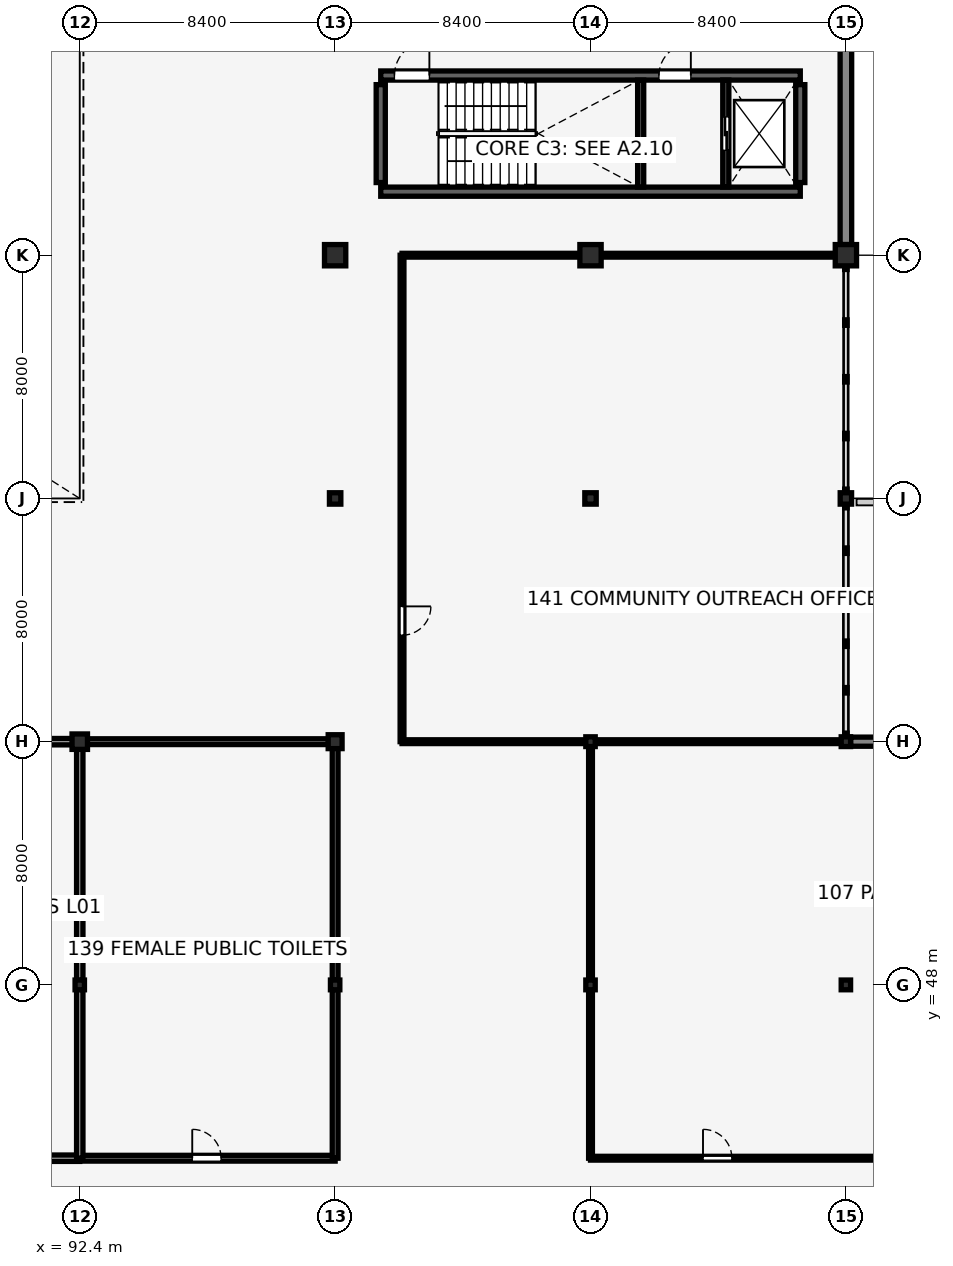
"""IFC4 building model, lengths in metres.
Left out: names, types, materials, properties, quantities, classifications, styles, units other than length and angle.
Written with IfcOpenShell. Run it as: python <this file> out.ifc"""

import sys

from ifc_helpers import new_model, si_unit, direction, frame, frame_2d, origin, origin_2d, place, context, subcontext, project, spatial, rectangle, hollow_circle, i_section, extrude, element, fill, save


model = new_model("IFC4")
c1 = context("Model", 3, precision=1e-05, world=origin(), true_north=direction((0.0, 1.0)))
c2 = subcontext(c1, "Body", "Model", "MODEL_VIEW")
j1 = project(units=[si_unit("LENGTHUNIT", "METRE"), si_unit("PLANEANGLEUNIT", "RADIAN")], contexts=[c1])
p1 = place(None, origin())
s1 = spatial("IfcSite", under=j1, at=p1, CompositionType="ELEMENT")
p2 = place(p1, origin())
s2 = spatial("IfcBuilding", under=s1, at=p2, CompositionType="ELEMENT")
p3 = place(p2, frame((0.0, 0.0, 5.44)))
s3 = spatial("IfcBuildingStorey", under=s2, at=p3, CompositionType="ELEMENT", Elevation=5.44)
p4 = place(p3, frame((102.3, 74.09, 0.0), z_axis=(0.0, 0.0, 1.0), x_axis=(1.0, 0.0, 0.0)))
e1 = element("IfcWall", 1, at=p4, inside=s3, PredefinedType="SHEAR", context=c2, shape_type="SweptSolid", body=[
    extrude(rectangle(XDim=13.8, YDim=0.3, at=frame_2d((6.9, 0.0))), origin(), (0.0, 0.0, 1.0), 3.8),
])
p5 = place(p3, frame((102.3, 77.91, 0.0), z_axis=(0.0, 0.0, 1.0), x_axis=(1.0, 0.0, 0.0)))
e2 = element("IfcWall", 2, at=p5, inside=s3, PredefinedType="SHEAR", context=c2, shape_type="SweptSolid", body=[
    extrude(rectangle(XDim=13.8, YDim=0.3, at=frame_2d((6.9, 0.0))), origin(), (0.0, 0.0, 1.0), 3.8),
])
p6 = place(p5, frame((0.45, 0.0, 0.0), z_axis=(0.0, 0.0, 1.0), x_axis=(1.0, 0.0, 0.0)))
e3 = element("IfcOpeningElement", 3, at=p6, cuts=e2, PredefinedType="OPENING", context=c2, shape_type="SweptSolid", body=[
    extrude(rectangle(XDim=1.15, YDim=2.15, at=frame_2d((0.575, 1.075))), frame((0.0, 0.16, 0.0), z_axis=(0.0, -1.0, 0.0), x_axis=(1.0, 0.0, 0.0)), (0.0, 0.0, 1.0), 0.32),
])
p7 = place(p5, frame((9.15, 0.0, 0.0), z_axis=(0.0, 0.0, 1.0), x_axis=(1.0, 0.0, 0.0)))
e4 = element("IfcOpeningElement", 4, at=p7, cuts=e2, PredefinedType="OPENING", context=c2, shape_type="SweptSolid", body=[
    extrude(rectangle(XDim=1.05, YDim=2.15, at=frame_2d((0.525, 1.075))), frame((0.0, 0.16, 0.0), z_axis=(0.0, -1.0, 0.0), x_axis=(1.0, 0.0, 0.0)), (0.0, 0.0, 1.0), 0.32),
])
for number, where, z_axis, x_axis in (
    (5, (102.3, 74.39, 0.0), (0.0, 0.0, 1.0), (0.0, 1.0, 0.0)),
    (6, (116.1, 74.39, 0.0), (0.0, 0.0, 1.0), (0.0, 1.0, 0.0)),
):
    element("IfcWall", number, at=place(p3, frame(where, z_axis=z_axis, x_axis=x_axis)), inside=s3, PredefinedType="SHEAR", context=c2, shape_type="SweptSolid", body=[
        extrude(rectangle(XDim=3.22, YDim=0.3, at=frame_2d((1.61, 0.0))), origin(), (0.0, 0.0, 1.0), 3.8),
    ])
p8 = place(p3, frame((92.4, 48.0, 0.0), z_axis=(0.0, 0.0, 1.0), x_axis=(1.0, 0.0, 0.0)))
e7 = element("IfcColumn", 7, at=p8, inside=s3, PredefinedType="COLUMN", context=c2, shape_type="SweptSolid", body=[
    extrude(i_section(OverallWidth=0.309, OverallDepth=0.321, WebThickness=0.014, FlangeThickness=0.022, FilletRadius=0.015, at=origin_2d()), origin(), (0.0, 0.0, 1.0), 3.8),
])
p9 = place(p3, frame((92.4, 56.0, 0.0), z_axis=(0.0, 0.0, 1.0), x_axis=(1.0, 0.0, 0.0)))
e8 = element("IfcColumn", 8, at=p9, inside=s3, PredefinedType="COLUMN", context=c2, shape_type="SweptSolid", body=[
    extrude(hollow_circle(Radius=0.229, WallThickness=0.016, at=origin_2d()), origin(), (0.0, 0.0, 1.0), 12.952),
])
p10 = place(p3, frame((100.8, 48.0, 0.0), z_axis=(0.0, 0.0, 1.0), x_axis=(1.0, 0.0, 0.0)))
e9 = element("IfcColumn", 9, at=p10, inside=s3, PredefinedType="COLUMN", context=c2, shape_type="SweptSolid", body=[
    extrude(i_section(OverallWidth=0.309, OverallDepth=0.321, WebThickness=0.014, FlangeThickness=0.022, FilletRadius=0.015, at=origin_2d()), origin(), (0.0, 0.0, 1.0), 3.8),
])
p11 = place(p3, frame((100.8, 56.0, 0.0), z_axis=(0.0, 0.0, 1.0), x_axis=(1.0, 0.0, 0.0)))
e10 = element("IfcColumn", 10, at=p11, inside=s3, PredefinedType="COLUMN", context=c2, shape_type="SweptSolid", body=[
    extrude(hollow_circle(Radius=0.229, WallThickness=0.016, at=origin_2d()), origin(), (0.0, 0.0, 1.0), 16.31),
])
p12 = place(p3, frame((100.8, 64.0, 0.0), z_axis=(0.0, 0.0, 1.0), x_axis=(1.0, 0.0, 0.0)))
e11 = element("IfcColumn", 11, at=p12, inside=s3, PredefinedType="COLUMN", context=c2, shape_type="SweptSolid", body=[
    extrude(i_section(OverallWidth=0.375, OverallDepth=0.375, WebThickness=0.017, FlangeThickness=0.027, FilletRadius=0.015, at=origin_2d()), origin(), (0.0, 0.0, 1.0), 3.8),
])
p13 = place(p3, frame((100.8, 72.0, 0.0), z_axis=(0.0, 0.0, 1.0), x_axis=(1.0, 0.0, 0.0)))
e12 = element("IfcColumn", 12, at=p13, inside=s3, PredefinedType="COLUMN", context=c2, shape_type="SweptSolid", body=[
    extrude(rectangle(XDim=0.7, YDim=0.7, at=origin_2d()), origin(), (0.0, 0.0, 1.0), 3.8),
])
for number, where, z_axis, x_axis in (
    (13, (109.2, 48.0, 0.0), (0.0, 0.0, 1.0), (1.0, 0.0, 0.0)),
    (14, (109.2, 56.0, 0.0), (0.0, 0.0, 1.0), (1.0, 0.0, 0.0)),
):
    element("IfcColumn", number, at=place(p3, frame(where, z_axis=z_axis, x_axis=x_axis)), inside=s3, PredefinedType="COLUMN", context=c2, shape_type="SweptSolid", body=[
        extrude(i_section(OverallWidth=0.309, OverallDepth=0.321, WebThickness=0.014, FlangeThickness=0.022, FilletRadius=0.015, at=origin_2d()), origin(), (0.0, 0.0, 1.0), 3.8),
    ])
p14 = place(p3, frame((109.2, 64.0, 0.0), z_axis=(0.0, 0.0, 1.0), x_axis=(1.0, 0.0, 0.0)))
e15 = element("IfcColumn", 15, at=p14, inside=s3, PredefinedType="COLUMN", context=c2, shape_type="SweptSolid", body=[
    extrude(i_section(OverallWidth=0.375, OverallDepth=0.375, WebThickness=0.017, FlangeThickness=0.027, FilletRadius=0.015, at=origin_2d()), origin(), (0.0, 0.0, 1.0), 3.8),
])
p15 = place(p3, frame((109.2, 72.0, 0.0), z_axis=(0.0, 0.0, 1.0), x_axis=(1.0, 0.0, 0.0)))
e16 = element("IfcColumn", 16, at=p15, inside=s3, PredefinedType="COLUMN", context=c2, shape_type="SweptSolid", body=[
    extrude(rectangle(XDim=0.7, YDim=0.7, at=origin_2d()), origin(), (0.0, 0.0, 1.0), 3.8),
])
for number, where, z_axis, x_axis in (
    (17, (117.6, 48.0, 0.0), (0.0, 0.0, 1.0), (1.0, 0.0, 0.0)),
    (18, (117.6, 56.0, 0.0), (0.0, 0.0, 1.0), (1.0, 0.0, 0.0)),
):
    element("IfcColumn", number, at=place(p3, frame(where, z_axis=z_axis, x_axis=x_axis)), inside=s3, PredefinedType="COLUMN", context=c2, shape_type="SweptSolid", body=[
        extrude(i_section(OverallWidth=0.309, OverallDepth=0.321, WebThickness=0.014, FlangeThickness=0.022, FilletRadius=0.015, at=origin_2d()), origin(), (0.0, 0.0, 1.0), 3.8),
    ])
p16 = place(p3, frame((117.6, 64.0, 0.0), z_axis=(0.0, 0.0, 1.0), x_axis=(1.0, 0.0, 0.0)))
e19 = element("IfcColumn", 19, at=p16, inside=s3, PredefinedType="COLUMN", context=c2, shape_type="SweptSolid", body=[
    extrude(i_section(OverallWidth=0.375, OverallDepth=0.375, WebThickness=0.017, FlangeThickness=0.027, FilletRadius=0.015, at=origin_2d()), origin(), (0.0, 0.0, 1.0), 3.8),
])
p17 = place(p3, frame((117.6, 72.0, 0.0), z_axis=(0.0, 0.0, 1.0), x_axis=(1.0, 0.0, 0.0)))
e20 = element("IfcColumn", 20, at=p17, inside=s3, PredefinedType="COLUMN", context=c2, shape_type="SweptSolid", body=[
    extrude(rectangle(XDim=0.7, YDim=0.7, at=origin_2d()), origin(), (0.0, 0.0, 1.0), 3.8),
])
p18 = place(p3, frame((92.4, 56.0, 13.002), z_axis=(0.0, -0.105430502232, 0.994426673616), x_axis=(1.0, 0.0, 0.0)))
e21 = element("IfcColumn", 21, at=p18, inside=s3, PredefinedType="COLUMN", context=c2, shape_type="SweptSolid", body=[
    extrude(hollow_circle(Radius=0.254, WallThickness=0.02, at=origin_2d()), origin(), (0.0, 0.0, 1.0), 2.846),
])
p19 = place(p3, frame((117.6, 72.35, 0.0), z_axis=(0.0, 0.0, 1.0), x_axis=(0.0, 1.0, 0.0)))
e22 = element("IfcWall", 22, at=p19, inside=s3, PredefinedType="SOLIDWALL", context=c2, shape_type="SweptSolid", body=[
    extrude(rectangle(XDim=7.3, YDim=0.38, at=frame_2d((3.65, 0.0))), origin(), (0.0, 0.0, 1.0), 3.5),
])
p20 = place(p3, frame((117.755, 56.0, 0.0), z_axis=(0.0, 0.0, 1.0), x_axis=(1.0, 0.0, 0.0)))
e23 = element("IfcWall", 23, at=p20, inside=s3, PredefinedType="SOLIDWALL", context=c2, shape_type="SweptSolid", body=[
    extrude(rectangle(XDim=8.091, YDim=0.3, at=frame_2d((4.045, 0.0))), origin(), (0.0, 0.0, 1.0), 3.45),
])
p21 = place(p20, frame((2.445, 0.0, 0.9), z_axis=(0.0, 0.0, 1.0), x_axis=(1.0, 0.0, 0.0)))
e24 = element("IfcOpeningElement", 24, at=p21, cuts=e23, PredefinedType="OPENING", context=c2, shape_type="SweptSolid", body=[
    extrude(rectangle(XDim=3.2, YDim=1.65, at=frame_2d((1.6, 0.825))), frame((0.0, 0.16, 0.0), z_axis=(0.0, -1.0, 0.0), x_axis=(1.0, 0.0, 0.0)), (0.0, 0.0, 1.0), 0.32),
])
p22 = place(p3, frame((117.95, 63.88, 0.0), z_axis=(0.0, 0.0, 1.0), x_axis=(1.0, 0.0, 0.0)))
e25 = element("IfcWall", 25, at=p22, inside=s3, PredefinedType="PARAPET", context=c2, shape_type="SweptSolid", body=[
    extrude(rectangle(XDim=32.9, YDim=0.215, at=frame_2d((16.45, 0.0))), origin(), (0.0, 0.0, 1.0), 1.05),
])
p23 = place(p3, frame((110.85, 74.24, 0.0), z_axis=(0.0, 0.0, 1.0), x_axis=(0.0, 1.0, 0.0)))
e26 = element("IfcWall", 26, at=p23, inside=s3, PredefinedType="SHEAR", context=c2, shape_type="SweptSolid", body=[
    extrude(rectangle(XDim=3.52, YDim=0.2, at=frame_2d((1.76, 0.0))), origin(), (0.0, 0.0, 1.0), 3.8),
])
p24 = place(p3, frame((113.65, 74.24, 0.0), z_axis=(0.0, 0.0, 1.0), x_axis=(0.0, 1.0, 0.0)))
e27 = element("IfcWall", 27, at=p24, inside=s3, PredefinedType="SHEAR", context=c2, shape_type="SweptSolid", body=[
    extrude(rectangle(XDim=3.52, YDim=0.2, at=frame_2d((1.76, 0.0))), origin(), (0.0, 0.0, 1.0), 3.8),
])
p25 = place(p24, frame((1.21, 0.0, 0.0), z_axis=(0.0, 0.0, 1.0), x_axis=(1.0, 0.0, 0.0)))
e28 = element("IfcOpeningElement", 28, at=p25, cuts=e27, PredefinedType="OPENING", context=c2, shape_type="SweptSolid", body=[
    extrude(rectangle(XDim=1.1, YDim=2.15, at=frame_2d((0.55, 1.075))), frame((0.0, 0.11, 0.0), z_axis=(0.0, -1.0, 0.0), x_axis=(1.0, 0.0, 0.0)), (0.0, 0.0, 1.0), 0.22),
])
p26 = place(p3, frame((84.0, 42.3, 0.0), z_axis=(0.0, 0.0, 1.0), x_axis=(1.0, 0.0, 0.0)))
e29 = element("IfcWall", 29, at=p26, inside=s3, PredefinedType="PLUMBINGWALL", context=c2, shape_type="SweptSolid", body=[
    extrude(rectangle(XDim=8.4, YDim=0.21, at=frame_2d((4.2, 0.0))), origin(), (0.0, 0.0, 1.0), 3.8),
])
p27 = place(p26, frame((3.7, 0.0, 0.0), z_axis=(0.0, 0.0, 1.0), x_axis=(1.0, 0.0, 0.0)))
e30 = element("IfcOpeningElement", 30, at=p27, cuts=e29, PredefinedType="OPENING", context=c2, shape_type="SweptSolid", body=[
    extrude(rectangle(XDim=0.9, YDim=2.15, at=frame_2d((0.45, 1.075))), frame((0.0, 0.115, 0.0), z_axis=(0.0, -1.0, 0.0), x_axis=(1.0, 0.0, 0.0)), (0.0, 0.0, 1.0), 0.23),
])
p28 = place(p3, frame((92.4, 42.3, 0.0), z_axis=(0.0, 0.0, 1.0), x_axis=(1.0, 0.0, 0.0)))
e31 = element("IfcWall", 31, at=p28, inside=s3, PredefinedType="PLUMBINGWALL", context=c2, shape_type="SweptSolid", body=[
    extrude(rectangle(XDim=8.4, YDim=0.19, at=frame_2d((4.2, 0.0))), origin(), (0.0, 0.0, 1.0), 3.8),
])
p29 = place(p28, frame((3.7, 0.0, 0.0), z_axis=(0.0, 0.0, 1.0), x_axis=(1.0, 0.0, 0.0)))
e32 = element("IfcOpeningElement", 32, at=p29, cuts=e31, PredefinedType="OPENING", context=c2, shape_type="SweptSolid", body=[
    extrude(rectangle(XDim=0.95, YDim=2.15, at=frame_2d((0.475, 1.075))), frame((0.0, 0.105, 0.0), z_axis=(0.0, -1.0, 0.0), x_axis=(1.0, 0.0, 0.0)), (0.0, 0.0, 1.0), 0.21),
])
p30 = place(p3, frame((109.2, 42.3, 0.0), z_axis=(0.0, 0.0, 1.0), x_axis=(1.0, 0.0, 0.0)))
e33 = element("IfcWall", 33, at=p30, inside=s3, PredefinedType="PARTITIONING", context=c2, shape_type="SweptSolid", body=[
    extrude(rectangle(XDim=25.16, YDim=0.125, at=frame_2d((12.58, 0.0))), origin(), (0.0, 0.0, 1.0), 3.8),
])
p31 = place(p30, frame((3.7, 0.0, 0.0), z_axis=(0.0, 0.0, 1.0), x_axis=(1.0, 0.0, 0.0)))
e34 = element("IfcOpeningElement", 34, at=p31, cuts=e33, PredefinedType="OPENING", context=c2, shape_type="SweptSolid", body=[
    extrude(rectangle(XDim=0.95, YDim=2.15, at=frame_2d((0.475, 1.075))), frame((0.0, 0.073, 0.0), z_axis=(0.0, -1.0, 0.0), x_axis=(1.0, 0.0, 0.0)), (0.0, 0.0, 1.0), 0.145),
])
p32 = place(p3, frame((103.0, 56.0, 0.0), z_axis=(0.0, 0.0, 1.0), x_axis=(0.0, 1.0, 0.0)))
e35 = element("IfcWall", 35, at=p32, inside=s3, PredefinedType="PARTITIONING", context=c2, shape_type="SweptSolid", body=[
    extrude(rectangle(XDim=16.0, YDim=0.125, at=frame_2d((8.0, 0.0))), origin(), (0.0, 0.0, 1.0), 3.8),
])
p33 = place(p32, frame((4.45, 0.0, 0.0), z_axis=(0.0, 0.0, 1.0), x_axis=(-1.0, 0.0, 0.0)))
e36 = element("IfcOpeningElement", 36, at=p33, cuts=e35, PredefinedType="OPENING", context=c2, shape_type="SweptSolid", body=[
    extrude(rectangle(XDim=0.95, YDim=2.15, at=frame_2d((0.475, 1.075))), frame((0.0, 0.073, 0.0), z_axis=(0.0, -1.0, 0.0), x_axis=(1.0, 0.0, 0.0)), (0.0, 0.0, 1.0), 0.145),
])
p34 = place(p3, frame((84.219, 56.0, 0.0), z_axis=(0.0, 0.0, 1.0), x_axis=(1.0, 0.0, 0.0)))
e37 = element("IfcWall", 37, at=p34, inside=s3, PredefinedType="PLUMBINGWALL", context=c2, shape_type="SweptSolid", body=[
    extrude(rectangle(XDim=7.963, YDim=0.21, at=frame_2d((3.981, 0.0))), origin(), (0.0, 0.0, 1.0), 3.8),
])
p35 = place(p3, frame((92.4, 42.3, 0.0), z_axis=(0.0, 0.0, 1.0), x_axis=(0.0, 1.0, 0.0)))
e38 = element("IfcWall", 38, at=p35, inside=s3, PredefinedType="PLUMBINGWALL", context=c2, shape_type="SweptSolid", body=[
    extrude(rectangle(XDim=5.55, YDim=0.21, at=frame_2d((2.775, 0.0))), origin(), (0.0, 0.0, 1.0), 3.337),
])
p36 = place(p3, frame((92.4, 48.15, 0.0), z_axis=(0.0, 0.0, 1.0), x_axis=(0.0, 1.0, 0.0)))
e39 = element("IfcWall", 39, at=p36, inside=s3, PredefinedType="PLUMBINGWALL", context=c2, shape_type="SweptSolid", body=[
    extrude(rectangle(XDim=7.631, YDim=0.21, at=frame_2d((3.815, 0.0))), origin(), (0.0, 0.0, 1.0), 3.337),
])
p37 = place(p3, frame((92.618, 56.0, 0.0), z_axis=(0.0, 0.0, 1.0), x_axis=(1.0, 0.0, 0.0)))
e40 = element("IfcWall", 40, at=p37, inside=s3, PredefinedType="PLUMBINGWALL", context=c2, shape_type="SweptSolid", body=[
    extrude(rectangle(XDim=7.963, YDim=0.19, at=frame_2d((3.981, 0.0))), origin(), (0.0, 0.0, 1.0), 3.8),
])
p38 = place(p3, frame((100.8, 42.3, 0.0), z_axis=(0.0, 0.0, 1.0), x_axis=(0.0, 1.0, 0.0)))
e41 = element("IfcWall", 41, at=p38, inside=s3, PredefinedType="PLUMBINGWALL", context=c2, shape_type="SweptSolid", body=[
    extrude(rectangle(XDim=5.55, YDim=0.19, at=frame_2d((2.775, 0.0))), origin(), (0.0, 0.0, 1.0), 3.337),
])
p39 = place(p3, frame((100.8, 48.15, 0.0), z_axis=(0.0, 0.0, 1.0), x_axis=(0.0, 1.0, 0.0)))
e42 = element("IfcWall", 42, at=p39, inside=s3, PredefinedType="PLUMBINGWALL", context=c2, shape_type="SweptSolid", body=[
    extrude(rectangle(XDim=7.631, YDim=0.19, at=frame_2d((3.815, 0.0))), origin(), (0.0, 0.0, 1.0), 3.337),
])
p40 = place(p3, frame((109.344, 56.0, 0.0), z_axis=(0.0, 0.0, 1.0), x_axis=(1.0, 0.0, 0.0)))
e43 = element("IfcWall", 43, at=p40, inside=s3, PredefinedType="PARTITIONING", context=c2, shape_type="SweptSolid", body=[
    extrude(rectangle(XDim=8.111, YDim=0.125, at=frame_2d((4.055, 0.0))), origin(), (0.0, 0.0, 1.0), 3.26),
])
p41 = place(p3, frame((109.2, 42.3, 0.0), z_axis=(0.0, 0.0, 1.0), x_axis=(0.0, 1.0, 0.0)))
e44 = element("IfcWall", 44, at=p41, inside=s3, PredefinedType="PARTITIONING", context=c2, shape_type="SweptSolid", body=[
    extrude(rectangle(XDim=5.55, YDim=0.125, at=frame_2d((2.775, 0.0))), origin(), (0.0, 0.0, 1.0), 3.337),
])
p42 = place(p3, frame((109.2, 48.15, 0.0), z_axis=(0.0, 0.0, 1.0), x_axis=(0.0, 1.0, 0.0)))
e45 = element("IfcWall", 45, at=p42, inside=s3, PredefinedType="PARTITIONING", context=c2, shape_type="SweptSolid", body=[
    extrude(rectangle(XDim=7.699, YDim=0.125, at=frame_2d((3.85, 0.0))), origin(), (0.0, 0.0, 1.0), 3.337),
])
p43 = place(p3, frame((103.0, 56.0, 0.0), z_axis=(0.0, 0.0, 1.0), x_axis=(1.0, 0.0, 0.0)))
e46 = element("IfcWall", 46, at=p43, inside=s3, PredefinedType="PARTITIONING", context=c2, shape_type="SweptSolid", body=[
    extrude(rectangle(XDim=6.055, YDim=0.125, at=frame_2d((3.028, 0.0))), origin(), (0.0, 0.0, 1.0), 3.26),
])
p44 = place(p3, frame((103.0, 72.0, 0.0), z_axis=(0.0, 0.0, 1.0), x_axis=(1.0, 0.0, 0.0)))
e47 = element("IfcWall", 47, at=p44, inside=s3, PredefinedType="PARTITIONING", context=c2, shape_type="SweptSolid", body=[
    extrude(rectangle(XDim=5.86, YDim=0.125, at=frame_2d((2.93, 0.0))), origin(), (0.0, 0.0, 1.0), 3.26),
])
p45 = place(p3, frame((109.54, 72.0, 0.0), z_axis=(0.0, 0.0, 1.0), x_axis=(1.0, 0.0, 0.0)))
e48 = element("IfcWall", 48, at=p45, inside=s3, PredefinedType="PARTITIONING", context=c2, shape_type="SweptSolid", body=[
    extrude(rectangle(XDim=7.72, YDim=0.125, at=frame_2d((3.86, 0.0))), origin(), (0.0, 0.0, 1.0), 3.26),
])
p46 = place(p6, origin())
e49 = element("IfcDoor", 49, at=p46, inside=s3, OperationType="SINGLE_SWING_RIGHT", PredefinedType="DOOR", context=c2, shape_type="SweptSolid", body=[
    extrude(rectangle(XDim=1.15, YDim=2.15, at=frame_2d((0.575, 1.075))), frame((0.0, 0.025, 0.0), z_axis=(0.0, -1.0, 0.0), x_axis=(1.0, 0.0, 0.0)), (0.0, 0.0, 1.0), 0.05),
])
fill(e3, e49)
p47 = place(p7, origin())
e50 = element("IfcDoor", 50, at=p47, inside=s3, OperationType="SINGLE_SWING_RIGHT", PredefinedType="DOOR", context=c2, shape_type="SweptSolid", body=[
    extrude(rectangle(XDim=1.05, YDim=2.15, at=frame_2d((0.525, 1.075))), frame((0.0, 0.025, 0.0), z_axis=(0.0, -1.0, 0.0), x_axis=(1.0, 0.0, 0.0)), (0.0, 0.0, 1.0), 0.05),
])
fill(e4, e50)
p48 = place(p25, origin())
e51 = element("IfcDoor", 51, at=p48, inside=s3, OperationType="DOUBLE_DOOR_SLIDING", PredefinedType="DOOR", context=c2, shape_type="SweptSolid", body=[
    extrude(rectangle(XDim=1.1, YDim=2.15, at=frame_2d((0.55, 1.075))), frame((0.0, 0.025, 0.0), z_axis=(0.0, -1.0, 0.0), x_axis=(1.0, 0.0, 0.0)), (0.0, 0.0, 1.0), 0.05),
])
fill(e28, e51)
p49 = place(p29, origin())
e52 = element("IfcDoor", 52, at=p49, inside=s3, OperationType="SINGLE_SWING_LEFT", PredefinedType="DOOR", context=c2, shape_type="SweptSolid", body=[
    extrude(rectangle(XDim=0.95, YDim=2.15, at=frame_2d((0.475, 1.075))), frame((0.0, 0.025, 0.0), z_axis=(0.0, -1.0, 0.0), x_axis=(1.0, 0.0, 0.0)), (0.0, 0.0, 1.0), 0.05),
])
fill(e32, e52)
p50 = place(p31, origin())
e53 = element("IfcDoor", 53, at=p50, inside=s3, OperationType="SINGLE_SWING_LEFT", PredefinedType="DOOR", context=c2, shape_type="SweptSolid", body=[
    extrude(rectangle(XDim=0.95, YDim=2.15, at=frame_2d((0.475, 1.075))), frame((0.0, 0.025, 0.0), z_axis=(0.0, -1.0, 0.0), x_axis=(1.0, 0.0, 0.0)), (0.0, 0.0, 1.0), 0.05),
])
fill(e34, e53)
p51 = place(p33, origin())
e54 = element("IfcDoor", 54, at=p51, inside=s3, OperationType="SINGLE_SWING_LEFT", PredefinedType="DOOR", context=c2, shape_type="SweptSolid", body=[
    extrude(rectangle(XDim=0.95, YDim=2.15, at=frame_2d((0.475, 1.075))), frame((0.0, 0.025, 0.0), z_axis=(0.0, -1.0, 0.0), x_axis=(1.0, 0.0, 0.0)), (0.0, 0.0, 1.0), 0.05),
])
fill(e36, e54)
save(model, sys.argv[1])
